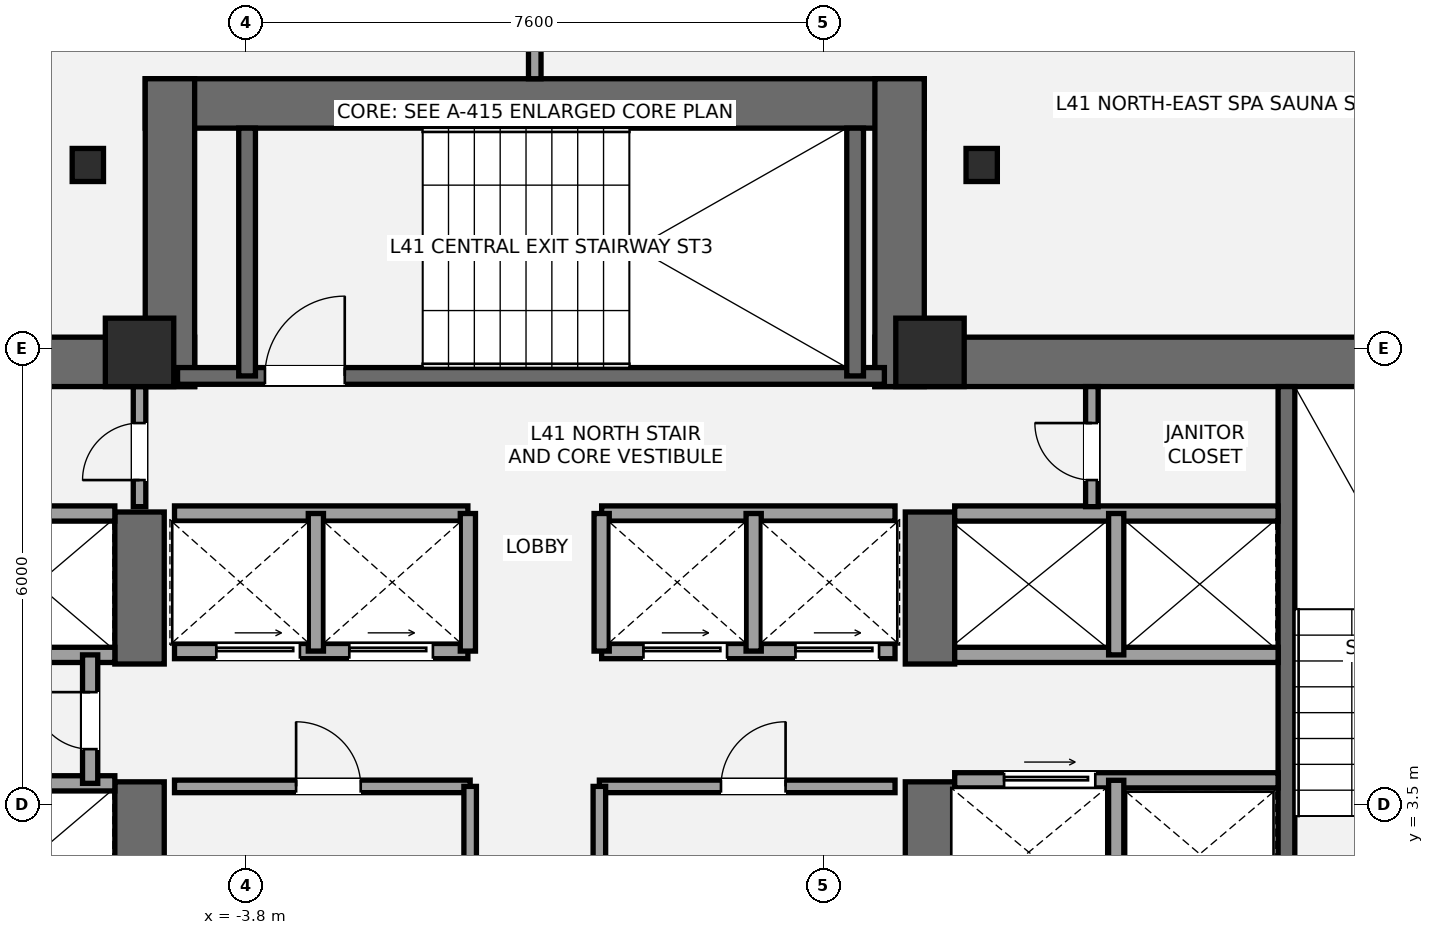
"""IFC4 building model, lengths in metres.
Left out: names, types, materials, properties, quantities, classifications, styles, units other than length and angle.
Written with IfcOpenShell. Run it as: python <this file> out.ifc"""

import sys

from ifc_helpers import new_model, si_unit, direction, frame, frame_2d, origin, origin_2d, place, context, subcontext, project, spatial, rectangle, i_section, extrude, element, fill, save


model = new_model("IFC4")
c1 = context("Model", 3, precision=1e-05, world=origin(), true_north=direction((0.0, 1.0)))
c2 = subcontext(c1, "Body", "Model", "MODEL_VIEW")
j1 = project(units=[si_unit("LENGTHUNIT", "METRE"), si_unit("PLANEANGLEUNIT", "RADIAN")], contexts=[c1])
p1 = place(None, origin())
s1 = spatial("IfcSite", under=j1, at=p1, CompositionType="ELEMENT")
p2 = place(p1, origin())
s2 = spatial("IfcBuilding", under=s1, at=p2, CompositionType="ELEMENT")
p3 = place(p2, frame((0.0, 0.0, 153.4)))
s3 = spatial("IfcBuildingStorey", under=s2, at=p3, CompositionType="ELEMENT", Elevation=153.4)
p4 = place(p3, frame((-13.8, 9.325, 0.0), z_axis=(0.0, 0.0, 1.0), x_axis=(1.0, 0.0, 0.0)))
e1 = element("IfcWall", 1, at=p4, inside=s3, PredefinedType="SHEAR", context=c2, shape_type="SweptSolid", body=[
    extrude(rectangle(XDim=9.325, YDim=0.65, at=frame_2d((4.663, 0.0))), origin(), (0.0, 0.0, 1.0), 3.2),
])
p5 = place(p3, frame((-5.2, 1.2, 0.0), z_axis=(0.0, 0.0, 1.0), x_axis=(0.0, 1.0, 0.0)))
e2 = element("IfcWall", 2, at=p5, inside=s3, PredefinedType="SHEAR", context=c2, shape_type="SweptSolid", body=[
    extrude(rectangle(XDim=2.6, YDim=0.65, at=frame_2d((1.3, 0.0))), origin(), (0.0, 0.0, 1.0), 3.2),
])
p6 = place(p3, frame((-5.2, 5.35, 0.0), z_axis=(0.0, 0.0, 1.0), x_axis=(0.0, 1.0, 0.0)))
e3 = element("IfcWall", 3, at=p6, inside=s3, PredefinedType="SHEAR", context=c2, shape_type="SweptSolid", body=[
    extrude(rectangle(XDim=2.0, YDim=0.65, at=frame_2d((1.0, 0.0))), origin(), (0.0, 0.0, 1.0), 3.2),
])
p7 = place(p3, frame((4.475, 9.325, 0.0), z_axis=(0.0, 0.0, 1.0), x_axis=(1.0, 0.0, 0.0)))
e4 = element("IfcWall", 4, at=p7, inside=s3, PredefinedType="SHEAR", context=c2, shape_type="SweptSolid", body=[
    extrude(rectangle(XDim=9.325, YDim=0.65, at=frame_2d((4.663, 0.0))), origin(), (0.0, 0.0, 1.0), 3.2),
])
p8 = place(p3, frame((5.2, 1.2, 0.0), z_axis=(0.0, 0.0, 1.0), x_axis=(0.0, 1.0, 0.0)))
e5 = element("IfcWall", 5, at=p8, inside=s3, PredefinedType="SHEAR", context=c2, shape_type="SweptSolid", body=[
    extrude(rectangle(XDim=2.6, YDim=0.65, at=frame_2d((1.3, 0.0))), origin(), (0.0, 0.0, 1.0), 3.2),
])
p9 = place(p3, frame((5.2, 5.35, 0.0), z_axis=(0.0, 0.0, 1.0), x_axis=(0.0, 1.0, 0.0)))
e6 = element("IfcWall", 6, at=p9, inside=s3, PredefinedType="SHEAR", context=c2, shape_type="SweptSolid", body=[
    extrude(rectangle(XDim=2.0, YDim=0.65, at=frame_2d((1.0, 0.0))), origin(), (0.0, 0.0, 1.0), 3.2),
])
p10 = place(p3, frame((9.89, 1.85, 0.0), z_axis=(0.0, 0.0, 1.0), x_axis=(0.0, 1.0, 0.0)))
e7 = element("IfcWall", 7, at=p10, inside=s3, PredefinedType="SHEAR", context=c2, shape_type="SweptSolid", body=[
    extrude(rectangle(XDim=7.15, YDim=0.22, at=frame_2d((3.575, 0.0))), origin(), (0.0, 0.0, 1.0), 3.2),
])
p11 = place(p3, frame((-5.125, 12.725, 0.0), z_axis=(0.0, 0.0, 1.0), x_axis=(1.0, 0.0, 0.0)))
e8 = element("IfcWall", 8, at=p11, inside=s3, PredefinedType="SHEAR", context=c2, shape_type="SweptSolid", body=[
    extrude(rectangle(XDim=10.25, YDim=0.65, at=frame_2d((5.125, 0.0))), origin(), (0.0, 0.0, 1.0), 3.2),
])
for number, where, z_axis, x_axis in (
    (9, (-4.8, 9.0, 0.0), (0.0, 0.0, 1.0), (0.0, 1.0, 0.0)),
    (10, (4.8, 9.0, 0.0), (0.0, 0.0, 1.0), (0.0, 1.0, 0.0)),
):
    element("IfcWall", number, at=place(p3, frame(where, z_axis=z_axis, x_axis=x_axis)), inside=s3, PredefinedType="SHEAR", context=c2, shape_type="SweptSolid", body=[
        extrude(rectangle(XDim=4.05, YDim=0.65, at=frame_2d((2.025, 0.0))), origin(), (0.0, 0.0, 1.0), 3.2),
    ])
p12 = place(p3, frame((-4.7, 9.14, 0.0), z_axis=(0.0, 0.0, 1.0), x_axis=(1.0, 0.0, 0.0)))
e11 = element("IfcWall", 11, at=p12, inside=s3, PredefinedType="SHEAR", context=c2, shape_type="SweptSolid", body=[
    extrude(rectangle(XDim=9.3, YDim=0.22, at=frame_2d((4.65, 0.0))), origin(), (0.0, 0.0, 1.0), 3.2),
])
p13 = place(p12, frame((1.15, 0.0, 0.0)))
e12 = element("IfcOpeningElement", 12, at=p13, cuts=e11, PredefinedType="OPENING", context=c2, shape_type="SweptSolid", body=[
    extrude(rectangle(XDim=1.05, YDim=2.15, at=frame_2d((0.525, 1.075))), frame((0.0, 0.12, 0.0), z_axis=(0.0, -1.0, 0.0), x_axis=(1.0, 0.0, 0.0)), (0.0, 0.0, 1.0), 0.24),
])
for number, where, z_axis, x_axis in (
    (13, (-3.785, 9.14, 0.0), (0.0, 0.0, 1.0), (0.0, 1.0, 0.0)),
    (14, (4.215, 9.14, 0.0), (0.0, 0.0, 1.0), (0.0, 1.0, 0.0)),
):
    element("IfcWall", number, at=place(p3, frame(where, z_axis=z_axis, x_axis=x_axis)), inside=s3, PredefinedType="SHEAR", context=c2, shape_type="SweptSolid", body=[
        extrude(rectangle(XDim=3.26, YDim=0.22, at=frame_2d((1.63, 0.0))), origin(), (0.0, 0.0, 1.0), 3.2),
    ])
for number, where, z_axis, x_axis in (
    (15, (-5.2, 9.45, 0.0), (0.0, 0.0, 1.0), (1.0, 0.0, 0.0)),
    (16, (5.2, 9.45, 0.0), (0.0, 0.0, 1.0), (1.0, 0.0, 0.0)),
):
    element("IfcColumn", number, at=place(p3, frame(where, z_axis=z_axis, x_axis=x_axis)), inside=s3, PredefinedType="COLUMN", context=c2, shape_type="SweptSolid", body=[
        extrude(rectangle(XDim=0.9, YDim=0.9, at=origin_2d()), origin(), (0.0, 0.0, 1.0), 3.2),
    ])
for number, where, z_axis, x_axis in (
    (17, (5.88, 11.915, 0.0), (0.0, 0.0, 1.0), (1.0, 0.0, 0.0)),
    (18, (-5.88, 11.915, 0.0), (0.0, 0.0, 1.0), (1.0, 0.0, 0.0)),
):
    element("IfcColumn", number, at=place(p3, frame(where, z_axis=z_axis, x_axis=x_axis)), inside=s3, PredefinedType="COLUMN", context=c2, shape_type="SweptSolid", body=[
        extrude(i_section(OverallWidth=0.412, OverallDepth=0.435, WebThickness=0.036, FlangeThickness=0.057, at=origin_2d()), origin(), (0.0, 0.0, 1.0), 3.2),
    ])
for number, where, z_axis, x_axis in (
    (19, (-9.78, 3.78, 0.0), (0.0, 0.0, 1.0), (1.0, 0.0, 0.0)),
    (20, (-9.78, 5.47, 0.0), (0.0, 0.0, 1.0), (1.0, 0.0, 0.0)),
    (21, (-9.78, 7.33, 0.0), (0.0, 0.0, 1.0), (1.0, 0.0, 0.0)),
):
    element("IfcWall", number, at=place(p3, frame(where, z_axis=z_axis, x_axis=x_axis)), inside=s3, PredefinedType="SOLIDWALL", context=c2, shape_type="SweptSolid", body=[
        extrude(rectangle(XDim=4.255, YDim=0.2, at=frame_2d((2.127, 0.0))), origin(), (0.0, 0.0, 1.0), 3.02),
    ])
p14 = place(p3, frame((-5.85, 3.78, 0.0), z_axis=(0.0, 0.0, 1.0), x_axis=(0.0, 1.0, 0.0)))
e22 = element("IfcWall", 22, at=p14, inside=s3, PredefinedType="SOLIDWALL", context=c2, shape_type="SweptSolid", body=[
    extrude(rectangle(XDim=1.69, YDim=0.2, at=frame_2d((0.845, 0.0))), origin(), (0.0, 0.0, 1.0), 3.02),
])
p15 = place(p14, frame((0.45, 0.0, 0.0)))
e23 = element("IfcOpeningElement", 23, at=p15, cuts=e22, PredefinedType="OPENING", context=c2, shape_type="SweptSolid", body=[
    extrude(rectangle(XDim=0.75, YDim=2.1, at=frame_2d((0.375, 1.05))), frame((0.0, 0.11, 0.0), z_axis=(0.0, -1.0, 0.0), x_axis=(1.0, 0.0, 0.0)), (0.0, 0.0, 1.0), 0.22),
])
p16 = place(p3, frame((5.525, 3.82, 0.0), z_axis=(0.0, 0.0, 1.0), x_axis=(1.0, 0.0, 0.0)))
e24 = element("IfcWall", 24, at=p16, inside=s3, PredefinedType="SOLIDWALL", context=c2, shape_type="SweptSolid", body=[
    extrude(rectangle(XDim=4.255, YDim=0.2, at=frame_2d((2.127, 0.0))), origin(), (0.0, 0.0, 1.0), 3.02),
])
p17 = place(p16, frame((0.65, 0.0, 0.0)))
e25 = element("IfcOpeningElement", 25, at=p17, cuts=e24, PredefinedType="OPENING", context=c2, shape_type="SweptSolid", body=[
    extrude(rectangle(XDim=1.2, YDim=2.2, at=frame_2d((0.6, 1.1))), frame((0.0, 0.11, 0.0), z_axis=(0.0, -1.0, 0.0), x_axis=(1.0, 0.0, 0.0)), (0.0, 0.0, 1.0), 0.22),
])
p18 = place(p3, frame((7.65, 1.85, 0.0), z_axis=(0.0, 0.0, 1.0), x_axis=(0.0, 1.0, 0.0)))
e26 = element("IfcWall", 26, at=p18, inside=s3, PredefinedType="SOLIDWALL", context=c2, shape_type="SweptSolid", body=[
    extrude(rectangle(XDim=1.97, YDim=0.2, at=frame_2d((0.985, 0.0))), origin(), (0.0, 0.0, 1.0), 3.02),
])
for number, where, z_axis, x_axis in (
    (27, (5.525, 5.47, 0.0), (0.0, 0.0, 1.0), (1.0, 0.0, 0.0)),
    (28, (5.525, 7.33, 0.0), (0.0, 0.0, 1.0), (1.0, 0.0, 0.0)),
):
    element("IfcWall", number, at=place(p3, frame(where, z_axis=z_axis, x_axis=x_axis)), inside=s3, PredefinedType="SOLIDWALL", context=c2, shape_type="SweptSolid", body=[
        extrude(rectangle(XDim=4.255, YDim=0.2, at=frame_2d((2.127, 0.0))), origin(), (0.0, 0.0, 1.0), 3.02),
    ])
p19 = place(p3, frame((7.65, 5.47, 0.0), z_axis=(0.0, 0.0, 1.0), x_axis=(0.0, 1.0, 0.0)))
e29 = element("IfcWall", 29, at=p19, inside=s3, PredefinedType="SOLIDWALL", context=c2, shape_type="SweptSolid", body=[
    extrude(rectangle(XDim=1.86, YDim=0.2, at=frame_2d((0.93, 0.0))), origin(), (0.0, 0.0, 1.0), 3.02),
])
p20 = place(p3, frame((-4.74, 3.74, 0.0), z_axis=(0.0, 0.0, 1.0), x_axis=(1.0, 0.0, 0.0)))
e30 = element("IfcWall", 30, at=p20, inside=s3, PredefinedType="PARTITIONING", context=c2, shape_type="SweptSolid", body=[
    extrude(rectangle(XDim=3.89, YDim=0.165, at=frame_2d((1.945, 0.0))), origin(), (0.0, 0.0, 1.0), 3.02),
])
p21 = place(p20, frame((1.6, 0.0, 0.0)))
e31 = element("IfcOpeningElement", 31, at=p21, cuts=e30, PredefinedType="OPENING", context=c2, shape_type="SweptSolid", body=[
    extrude(rectangle(XDim=0.85, YDim=2.1, at=frame_2d((0.425, 1.05))), frame((0.0, 0.093, 0.0), z_axis=(0.0, -1.0, 0.0), x_axis=(1.0, 0.0, 0.0)), (0.0, 0.0, 1.0), 0.185),
])
p22 = place(p3, frame((-0.85, 1.92, 0.0), z_axis=(0.0, 0.0, 1.0), x_axis=(0.0, 1.0, 0.0)))
e32 = element("IfcWall", 32, at=p22, inside=s3, PredefinedType="PARTITIONING", context=c2, shape_type="SweptSolid", body=[
    extrude(rectangle(XDim=1.82, YDim=0.165, at=frame_2d((0.91, 0.0))), origin(), (0.0, 0.0, 1.0), 3.02),
])
p23 = place(p3, frame((0.85, 3.74, 0.0), z_axis=(0.0, 0.0, 1.0), x_axis=(1.0, 0.0, 0.0)))
e33 = element("IfcWall", 33, at=p23, inside=s3, PredefinedType="PARTITIONING", context=c2, shape_type="SweptSolid", body=[
    extrude(rectangle(XDim=3.89, YDim=0.165, at=frame_2d((1.945, 0.0))), origin(), (0.0, 0.0, 1.0), 3.02),
])
p24 = place(p23, frame((1.6, 0.0, 0.0)))
e34 = element("IfcOpeningElement", 34, at=p24, cuts=e33, PredefinedType="OPENING", context=c2, shape_type="SweptSolid", body=[
    extrude(rectangle(XDim=0.85, YDim=2.1, at=frame_2d((0.425, 1.05))), frame((0.0, 0.093, 0.0), z_axis=(0.0, -1.0, 0.0), x_axis=(1.0, 0.0, 0.0)), (0.0, 0.0, 1.0), 0.185),
])
p25 = place(p3, frame((0.85, 1.92, 0.0), z_axis=(0.0, 0.0, 1.0), x_axis=(0.0, 1.0, 0.0)))
e35 = element("IfcWall", 35, at=p25, inside=s3, PredefinedType="PARTITIONING", context=c2, shape_type="SweptSolid", body=[
    extrude(rectangle(XDim=1.82, YDim=0.165, at=frame_2d((0.91, 0.0))), origin(), (0.0, 0.0, 1.0), 3.02),
])
p26 = place(p3, frame((-4.74, 5.52, 0.0), z_axis=(0.0, 0.0, 1.0), x_axis=(1.0, 0.0, 0.0)))
e36 = element("IfcWall", 36, at=p26, inside=s3, PredefinedType="SOLIDWALL", context=c2, shape_type="SweptSolid", body=[
    extrude(rectangle(XDim=3.86, YDim=0.2, at=frame_2d((1.93, 0.0))), origin(), (0.0, 0.0, 1.0), 3.02),
])
p27 = place(p26, frame((0.55, 0.0, 0.0)))
e37 = element("IfcOpeningElement", 37, at=p27, cuts=e36, PredefinedType="OPENING", context=c2, shape_type="SweptSolid", body=[
    extrude(rectangle(XDim=1.1, YDim=2.2, at=frame_2d((0.55, 1.1))), frame((0.0, 0.11, 0.0), z_axis=(0.0, -1.0, 0.0), x_axis=(1.0, 0.0, 0.0)), (0.0, 0.0, 1.0), 0.22),
])
p28 = place(p26, frame((2.3, 0.0, 0.0)))
e38 = element("IfcOpeningElement", 38, at=p28, cuts=e36, PredefinedType="OPENING", context=c2, shape_type="SweptSolid", body=[
    extrude(rectangle(XDim=1.1, YDim=2.2, at=frame_2d((0.55, 1.1))), frame((0.0, 0.11, 0.0), z_axis=(0.0, -1.0, 0.0), x_axis=(1.0, 0.0, 0.0)), (0.0, 0.0, 1.0), 0.22),
])
p29 = place(p3, frame((0.88, 5.52, 0.0), z_axis=(0.0, 0.0, 1.0), x_axis=(1.0, 0.0, 0.0)))
e39 = element("IfcWall", 39, at=p29, inside=s3, PredefinedType="SOLIDWALL", context=c2, shape_type="SweptSolid", body=[
    extrude(rectangle(XDim=3.86, YDim=0.2, at=frame_2d((1.93, 0.0))), origin(), (0.0, 0.0, 1.0), 3.02),
])
p30 = place(p29, frame((0.55, 0.0, 0.0)))
e40 = element("IfcOpeningElement", 40, at=p30, cuts=e39, PredefinedType="OPENING", context=c2, shape_type="SweptSolid", body=[
    extrude(rectangle(XDim=1.1, YDim=2.2, at=frame_2d((0.55, 1.1))), frame((0.0, 0.11, 0.0), z_axis=(0.0, -1.0, 0.0), x_axis=(1.0, 0.0, 0.0)), (0.0, 0.0, 1.0), 0.22),
])
p31 = place(p29, frame((2.55, 0.0, 0.0)))
e41 = element("IfcOpeningElement", 41, at=p31, cuts=e39, PredefinedType="OPENING", context=c2, shape_type="SweptSolid", body=[
    extrude(rectangle(XDim=1.1, YDim=2.2, at=frame_2d((0.55, 1.1))), frame((0.0, 0.11, 0.0), z_axis=(0.0, -1.0, 0.0), x_axis=(1.0, 0.0, 0.0)), (0.0, 0.0, 1.0), 0.22),
])
for number, where, z_axis, x_axis in (
    (42, (-4.74, 7.33, 0.0), (0.0, 0.0, 1.0), (1.0, 0.0, 0.0)),
    (43, (0.88, 7.33, 0.0), (0.0, 0.0, 1.0), (1.0, 0.0, 0.0)),
):
    element("IfcWall", number, at=place(p3, frame(where, z_axis=z_axis, x_axis=x_axis)), inside=s3, PredefinedType="SOLIDWALL", context=c2, shape_type="SweptSolid", body=[
        extrude(rectangle(XDim=3.86, YDim=0.2, at=frame_2d((1.93, 0.0))), origin(), (0.0, 0.0, 1.0), 3.02),
    ])
for number, where, z_axis, x_axis in (
    (44, (-2.88, 5.52, 0.0), (0.0, 0.0, 1.0), (0.0, 1.0, 0.0)),
    (45, (2.88, 5.52, 0.0), (0.0, 0.0, 1.0), (0.0, 1.0, 0.0)),
):
    element("IfcWall", number, at=place(p3, frame(where, z_axis=z_axis, x_axis=x_axis)), inside=s3, PredefinedType="SOLIDWALL", context=c2, shape_type="SweptSolid", body=[
        extrude(rectangle(XDim=1.81, YDim=0.2, at=frame_2d((0.905, 0.0))), origin(), (0.0, 0.0, 1.0), 3.02),
    ])
p32 = place(p3, frame((-0.88, 5.52, 0.0), z_axis=(0.0, 0.0, 1.0), x_axis=(0.0, 1.0, 0.0)))
e46 = element("IfcWall", 46, at=p32, inside=s3, PredefinedType="SOLIDWALL", context=c2, shape_type="SweptSolid", body=[
    extrude(rectangle(XDim=1.81, YDim=0.2, at=frame_2d((0.905, 0.0))), origin(), (0.0, 0.0, 1.0), 2.473),
])
p33 = place(p3, frame((0.88, 5.52, 0.0), z_axis=(0.0, 0.0, 1.0), x_axis=(0.0, 1.0, 0.0)))
e47 = element("IfcWall", 47, at=p33, inside=s3, PredefinedType="SOLIDWALL", context=c2, shape_type="SweptSolid", body=[
    extrude(rectangle(XDim=1.81, YDim=0.2, at=frame_2d((0.905, 0.0))), origin(), (0.0, 0.0, 1.0), 3.02),
])
p34 = place(p3, frame((-5.2, 7.42, 0.0), z_axis=(0.0, 0.0, 1.0), x_axis=(0.0, 1.0, 0.0)))
e48 = element("IfcWall", 48, at=p34, inside=s3, PredefinedType="PARTITIONING", context=c2, shape_type="SweptSolid", body=[
    extrude(rectangle(XDim=1.58, YDim=0.165, at=frame_2d((0.79, 0.0))), origin(), (0.0, 0.0, 1.0), 3.02),
])
p35 = place(p34, frame((0.35, 0.0, 0.0)))
e49 = element("IfcOpeningElement", 49, at=p35, cuts=e48, PredefinedType="OPENING", context=c2, shape_type="SweptSolid", body=[
    extrude(rectangle(XDim=0.75, YDim=2.1, at=frame_2d((0.375, 1.05))), frame((0.0, 0.093, 0.0), z_axis=(0.0, -1.0, 0.0), x_axis=(1.0, 0.0, 0.0)), (0.0, 0.0, 1.0), 0.185),
])
p36 = place(p3, frame((7.33, 7.42, 0.0), z_axis=(0.0, 0.0, 1.0), x_axis=(0.0, 1.0, 0.0)))
e50 = element("IfcWall", 50, at=p36, inside=s3, PredefinedType="PARTITIONING", context=c2, shape_type="SweptSolid", body=[
    extrude(rectangle(XDim=1.58, YDim=0.165, at=frame_2d((0.79, 0.0))), origin(), (0.0, 0.0, 1.0), 3.02),
])
p37 = place(p36, frame((0.35, 0.0, 0.0)))
e51 = element("IfcOpeningElement", 51, at=p37, cuts=e50, PredefinedType="OPENING", context=c2, shape_type="SweptSolid", body=[
    extrude(rectangle(XDim=0.75, YDim=2.1, at=frame_2d((0.375, 1.05))), frame((0.0, 0.093, 0.0), z_axis=(0.0, -1.0, 0.0), x_axis=(1.0, 0.0, 0.0)), (0.0, 0.0, 1.0), 0.185),
])
p38 = place(p3, frame((0.0, 13.05, 0.0), z_axis=(0.0, 0.0, 1.0), x_axis=(0.0, 1.0, 0.0)))
e52 = element("IfcWall", 52, at=p38, inside=s3, PredefinedType="PARTITIONING", context=c2, shape_type="SweptSolid", body=[
    extrude(rectangle(XDim=3.244, YDim=0.165, at=frame_2d((1.622, 0.0))), origin(), (0.0, 0.0, 1.0), 3.02),
])
p39 = place(p13, origin())
e53 = element("IfcDoor", 53, at=p39, inside=s3, OperationType="SINGLE_SWING_RIGHT", PredefinedType="DOOR", context=c2, shape_type="SweptSolid", body=[
    extrude(rectangle(XDim=1.05, YDim=2.15, at=frame_2d((0.525, 1.075))), frame((0.0, 0.025, 0.0), z_axis=(0.0, -1.0, 0.0), x_axis=(1.0, 0.0, 0.0)), (0.0, 0.0, 1.0), 0.05),
])
fill(e12, e53)
p40 = place(p15, origin())
e54 = element("IfcDoor", 54, at=p40, inside=s3, OperationType="SINGLE_SWING_RIGHT", PredefinedType="DOOR", context=c2, shape_type="SweptSolid", body=[
    extrude(rectangle(XDim=0.75, YDim=2.1, at=frame_2d((0.375, 1.05))), frame((0.0, 0.025, 0.0), z_axis=(0.0, -1.0, 0.0), x_axis=(1.0, 0.0, 0.0)), (0.0, 0.0, 1.0), 0.05),
])
fill(e23, e54)
p41 = place(p17, origin())
e55 = element("IfcDoor", 55, at=p41, inside=s3, OperationType="SLIDING_TO_RIGHT", PredefinedType="DOOR", context=c2, shape_type="SweptSolid", body=[
    extrude(rectangle(XDim=1.2, YDim=2.2, at=frame_2d((0.6, 1.1))), frame((0.0, 0.025, 0.0), z_axis=(0.0, -1.0, 0.0), x_axis=(1.0, 0.0, 0.0)), (0.0, 0.0, 1.0), 0.05),
])
fill(e25, e55)
p42 = place(p21, origin())
e56 = element("IfcDoor", 56, at=p42, inside=s3, OperationType="SINGLE_SWING_LEFT", PredefinedType="DOOR", context=c2, shape_type="SweptSolid", body=[
    extrude(rectangle(XDim=0.85, YDim=2.1, at=frame_2d((0.425, 1.05))), frame((0.0, 0.025, 0.0), z_axis=(0.0, -1.0, 0.0), x_axis=(1.0, 0.0, 0.0)), (0.0, 0.0, 1.0), 0.05),
])
fill(e31, e56)
p43 = place(p24, origin())
e57 = element("IfcDoor", 57, at=p43, inside=s3, OperationType="SINGLE_SWING_RIGHT", PredefinedType="DOOR", context=c2, shape_type="SweptSolid", body=[
    extrude(rectangle(XDim=0.85, YDim=2.1, at=frame_2d((0.425, 1.05))), frame((0.0, 0.025, 0.0), z_axis=(0.0, -1.0, 0.0), x_axis=(1.0, 0.0, 0.0)), (0.0, 0.0, 1.0), 0.05),
])
fill(e34, e57)
p44 = place(p27, origin())
e58 = element("IfcDoor", 58, at=p44, inside=s3, OperationType="SLIDING_TO_LEFT", PredefinedType="DOOR", context=c2, shape_type="SweptSolid", body=[
    extrude(rectangle(XDim=1.1, YDim=2.2, at=frame_2d((0.55, 1.1))), frame((0.0, 0.025, 0.0), z_axis=(0.0, -1.0, 0.0), x_axis=(1.0, 0.0, 0.0)), (0.0, 0.0, 1.0), 0.05),
])
fill(e37, e58)
p45 = place(p28, origin())
e59 = element("IfcDoor", 59, at=p45, inside=s3, OperationType="SLIDING_TO_LEFT", PredefinedType="DOOR", context=c2, shape_type="SweptSolid", body=[
    extrude(rectangle(XDim=1.1, YDim=2.2, at=frame_2d((0.55, 1.1))), frame((0.0, 0.025, 0.0), z_axis=(0.0, -1.0, 0.0), x_axis=(1.0, 0.0, 0.0)), (0.0, 0.0, 1.0), 0.05),
])
fill(e38, e59)
p46 = place(p30, origin())
e60 = element("IfcDoor", 60, at=p46, inside=s3, OperationType="SLIDING_TO_LEFT", PredefinedType="DOOR", context=c2, shape_type="SweptSolid", body=[
    extrude(rectangle(XDim=1.1, YDim=2.2, at=frame_2d((0.55, 1.1))), frame((0.0, 0.025, 0.0), z_axis=(0.0, -1.0, 0.0), x_axis=(1.0, 0.0, 0.0)), (0.0, 0.0, 1.0), 0.05),
])
fill(e40, e60)
p47 = place(p31, origin())
e61 = element("IfcDoor", 61, at=p47, inside=s3, OperationType="SLIDING_TO_LEFT", PredefinedType="DOOR", context=c2, shape_type="SweptSolid", body=[
    extrude(rectangle(XDim=1.1, YDim=2.2, at=frame_2d((0.55, 1.1))), frame((0.0, 0.025, 0.0), z_axis=(0.0, -1.0, 0.0), x_axis=(1.0, 0.0, 0.0)), (0.0, 0.0, 1.0), 0.05),
])
fill(e41, e61)
p48 = place(p35, origin())
e62 = element("IfcDoor", 62, at=p48, inside=s3, OperationType="SINGLE_SWING_LEFT", PredefinedType="DOOR", context=c2, shape_type="SweptSolid", body=[
    extrude(rectangle(XDim=0.75, YDim=2.1, at=frame_2d((0.375, 1.05))), frame((0.0, 0.025, 0.0), z_axis=(0.0, -1.0, 0.0), x_axis=(1.0, 0.0, 0.0)), (0.0, 0.0, 1.0), 0.05),
])
fill(e49, e62)
p49 = place(p37, origin())
e63 = element("IfcDoor", 63, at=p49, inside=s3, OperationType="SINGLE_SWING_RIGHT", PredefinedType="DOOR", context=c2, shape_type="SweptSolid", body=[
    extrude(rectangle(XDim=0.75, YDim=2.1, at=frame_2d((0.375, 1.05))), frame((0.0, 0.025, 0.0), z_axis=(0.0, -1.0, 0.0), x_axis=(1.0, 0.0, 0.0)), (0.0, 0.0, 1.0), 0.05),
])
fill(e51, e63)
save(model, sys.argv[1])
